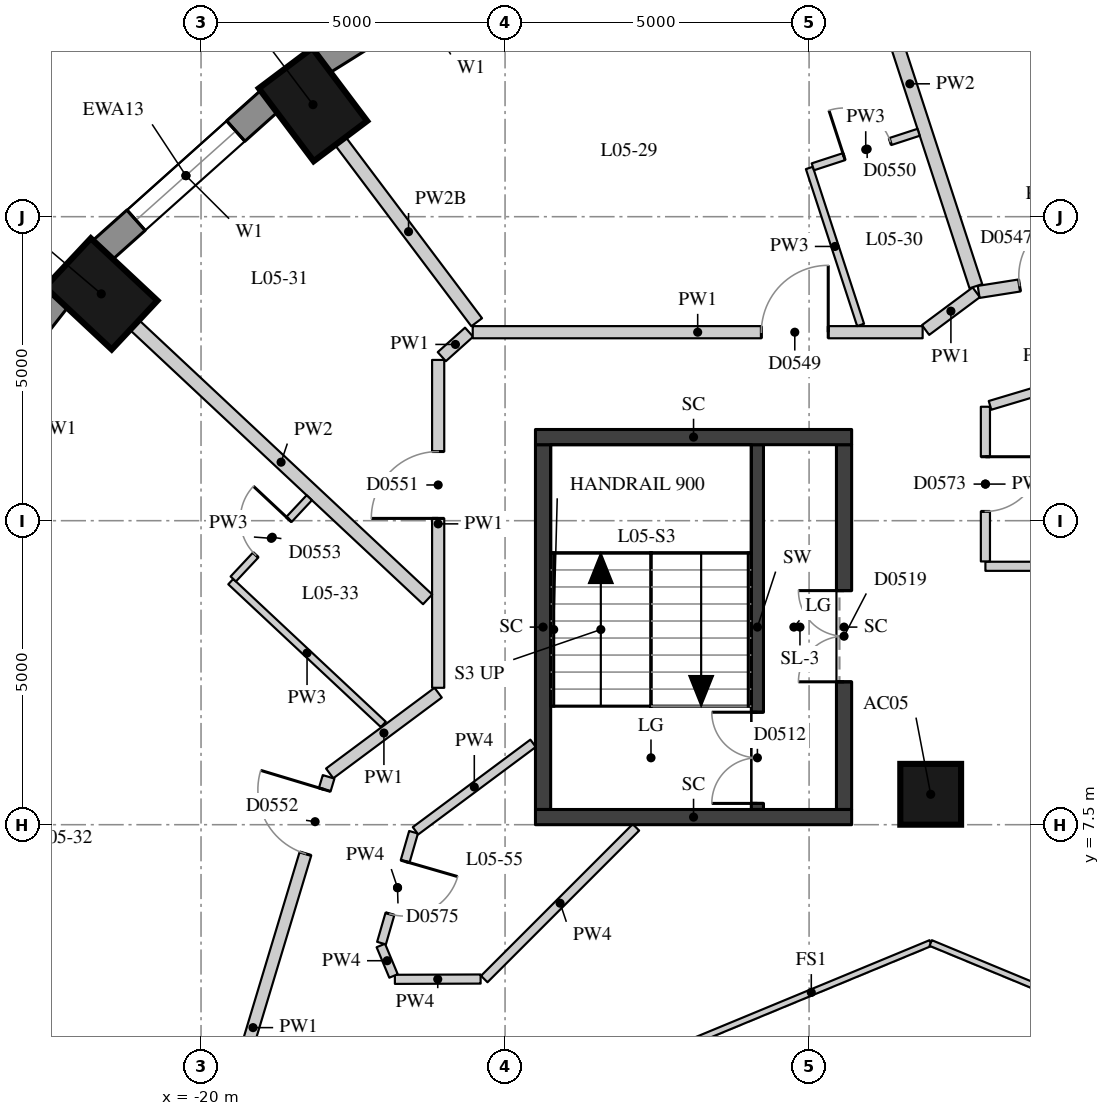
"""IFC4 building model, lengths in metres.
Left out: names, types, materials, properties, quantities, classifications, styles, units other than length and angle.
Written with IfcOpenShell. Run it as: python <this file> out.ifc"""

import sys

from ifc_helpers import new_model, si_unit, direction, frame, frame_2d, origin, origin_2d, place, context, subcontext, project, spatial, rectangle, extrude, element, fill, save


model = new_model("IFC4")
c1 = context("Model", 3, precision=1e-05, world=origin(), true_north=direction((0.0, 1.0)))
c2 = subcontext(c1, "Body", "Model", "MODEL_VIEW")
j1 = project(units=[si_unit("LENGTHUNIT", "METRE"), si_unit("PLANEANGLEUNIT", "RADIAN")], contexts=[c1])
p1 = place(None, origin())
s1 = spatial("IfcSite", under=j1, at=p1, CompositionType="ELEMENT")
p2 = place(p1, origin())
s2 = spatial("IfcBuilding", under=s1, at=p2, CompositionType="ELEMENT")
p3 = place(p2, frame((0.0, 0.0, 25.0)))
s3 = spatial("IfcBuildingStorey", under=s2, at=p3, CompositionType="ELEMENT", Elevation=25.0)
for number, where, z_axis, x_axis in (
    (1, (-18.159, 19.343, 0.0), (0.0, 0.0, 1.0), (-0.601, 0.799, 0.0)),
    (2, (-21.641, 16.23, 0.0), (0.0, 0.0, 1.0), (-0.73, 0.683, 0.0)),
):
    element("IfcColumn", number, at=place(p3, frame(where, z_axis=z_axis, x_axis=x_axis)), inside=s3, PredefinedType="COLUMN", context=c2, shape_type="SweptSolid", body=[
        extrude(rectangle(XDim=1.5, YDim=1.1, at=origin_2d()), origin(), (0.0, 0.0, 1.0), 3.3),
    ])
p4 = place(p3, frame((-8.0, 8.0, 0.0), z_axis=(0.0, 0.0, 1.0), x_axis=(1.0, 0.0, 0.0)))
e3 = element("IfcColumn", 3, at=p4, inside=s3, PredefinedType="COLUMN", context=c2, shape_type="SweptSolid", body=[
    extrude(rectangle(XDim=1.0, YDim=1.0, at=origin_2d()), origin(), (0.0, 0.0, 1.0), 3.3),
])
p5 = place(p3, frame((-14.817, 22.051, 0.0), z_axis=(0.0, 0.0, 1.0), x_axis=(-0.847635480093, -0.530579016629, 0.0)))
e4 = element("IfcWall", 4, at=p5, inside=s3, PredefinedType="SOLIDWALL", context=c2, shape_type="SweptSolid", body=[
    extrude(rectangle(XDim=3.782, YDim=0.45, at=frame_2d((1.891, 0.0))), origin(), (0.0, 0.0, 1.0), 3.02),
])
p6 = place(p5, frame((0.791, 0.0, 0.4)))
e5 = element("IfcOpeningElement", 5, at=p6, cuts=e4, PredefinedType="OPENING", context=c2, shape_type="SweptSolid", body=[
    extrude(rectangle(XDim=2.2, YDim=1.75, at=frame_2d((1.1, 0.875))), frame((0.0, 0.235, 0.0), z_axis=(0.0, -1.0, 0.0), x_axis=(1.0, 0.0, 0.0)), (0.0, 0.0, 1.0), 0.47),
])
p7 = place(p3, frame((-18.871, 19.407, 0.0), z_axis=(0.0, 0.0, 1.0), x_axis=(-0.745526233716, -0.66647628228, 0.0)))
e6 = element("IfcWall", 6, at=p7, inside=s3, PredefinedType="SOLIDWALL", context=c2, shape_type="SweptSolid", body=[
    extrude(rectangle(XDim=3.697, YDim=0.45, at=frame_2d((1.848, 0.0))), origin(), (0.0, 0.0, 1.0), 3.02),
])
p8 = place(p7, frame((0.749, 0.0, 0.4)))
e7 = element("IfcOpeningElement", 7, at=p8, cuts=e6, PredefinedType="OPENING", context=c2, shape_type="SweptSolid", body=[
    extrude(rectangle(XDim=2.2, YDim=1.75, at=frame_2d((1.1, 0.875))), frame((0.0, 0.235, 0.0), z_axis=(0.0, -1.0, 0.0), x_axis=(1.0, 0.0, 0.0)), (0.0, 0.0, 1.0), 0.47),
])
p9 = place(p3, frame((-22.352, 16.17, 0.0), z_axis=(0.0, 0.0, 1.0), x_axis=(-0.616661975264, -0.787228053529, 0.0)))
e8 = element("IfcWall", 8, at=p9, inside=s3, PredefinedType="SOLIDWALL", context=c2, shape_type="SweptSolid", body=[
    extrude(rectangle(XDim=3.61, YDim=0.45, at=frame_2d((1.805, 0.0))), origin(), (0.0, 0.0, 1.0), 3.02),
])
p10 = place(p9, frame((0.705, 0.0, 0.4)))
e9 = element("IfcOpeningElement", 9, at=p10, cuts=e8, PredefinedType="OPENING", context=c2, shape_type="SweptSolid", body=[
    extrude(rectangle(XDim=2.2, YDim=1.75, at=frame_2d((1.1, 0.875))), frame((0.0, 0.235, 0.0), z_axis=(0.0, -1.0, 0.0), x_axis=(1.0, 0.0, 0.0)), (0.0, 0.0, 1.0), 0.47),
])
p11 = place(p3, frame((-10.85, 7.75, 0.0), z_axis=(0.0, 0.0, 1.0), x_axis=(0.0, 1.0, 0.0)))
e10 = element("IfcWall", 10, at=p11, inside=s3, PredefinedType="SHEAR", context=c2, shape_type="SweptSolid", body=[
    extrude(rectangle(XDim=6.0, YDim=0.2, at=frame_2d((3.0, 0.0))), origin(), (0.0, 0.0, 1.0), 3.02),
])
p12 = place(p11, frame((0.1, 0.0, 0.0)))
e11 = element("IfcOpeningElement", 11, at=p12, cuts=e10, PredefinedType="OPENING", context=c2, shape_type="SweptSolid", body=[
    extrude(rectangle(XDim=1.5, YDim=2.1, at=frame_2d((0.75, 1.05))), frame((0.0, 0.11, 0.0), z_axis=(0.0, -1.0, 0.0), x_axis=(1.0, 0.0, 0.0)), (0.0, 0.0, 1.0), 0.22),
])
p13 = place(p3, frame((-14.375, 7.75, -0.28), z_axis=(0.0, 0.0, 1.0), x_axis=(0.0, 1.0, 0.0)))
e12 = element("IfcWall", 12, at=p13, inside=s3, PredefinedType="SHEAR", context=c2, shape_type="SweptSolid", body=[
    extrude(rectangle(XDim=6.0, YDim=0.25, at=frame_2d((3.0, 0.0))), origin(), (0.0, 0.0, 1.0), 3.3),
])
p14 = place(p3, frame((-9.425, 7.75, -0.28), z_axis=(0.0, 0.0, 1.0), x_axis=(0.0, 1.0, 0.0)))
e13 = element("IfcWall", 13, at=p14, inside=s3, PredefinedType="SHEAR", context=c2, shape_type="SweptSolid", body=[
    extrude(rectangle(XDim=6.0, YDim=0.25, at=frame_2d((3.0, 0.0))), origin(), (0.0, 0.0, 1.0), 3.3),
])
p15 = place(p14, frame((2.1, 0.0, 0.28)))
e14 = element("IfcOpeningElement", 14, at=p15, cuts=e13, PredefinedType="OPENING", context=c2, shape_type="SweptSolid", body=[
    extrude(rectangle(XDim=1.5, YDim=2.1, at=frame_2d((0.75, 1.05))), frame((0.0, 0.135, 0.0), z_axis=(0.0, -1.0, 0.0), x_axis=(1.0, 0.0, 0.0)), (0.0, 0.0, 1.0), 0.27),
])
for number, where, z_axis, x_axis in (
    (15, (-14.5, 13.875, -0.28), (0.0, 0.0, 1.0), (1.0, 0.0, 0.0)),
    (16, (-14.5, 7.625, -0.28), (0.0, 0.0, 1.0), (1.0, 0.0, 0.0)),
):
    element("IfcWall", number, at=place(p3, frame(where, z_axis=z_axis, x_axis=x_axis)), inside=s3, PredefinedType="SHEAR", context=c2, shape_type="SweptSolid", body=[
        extrude(rectangle(XDim=5.2, YDim=0.25, at=frame_2d((2.6, 0.0))), origin(), (0.0, 0.0, 1.0), 3.3),
    ])
p16 = place(p3, frame((-17.884, 8.344, 0.0), z_axis=(0.0, 0.0, 1.0), x_axis=(0.802260120548, 0.596974621721, 0.0)))
e17 = element("IfcWall", 17, at=p16, inside=s3, PredefinedType="PARTITIONING", context=c2, shape_type="SweptSolid", body=[
    extrude(rectangle(XDim=2.224, YDim=0.2, at=frame_2d((1.112, 0.0))), origin(), (0.0, 0.0, 1.0), 3.02),
])
p17 = place(p3, frame((-16.1, 9.751, 0.0), z_axis=(0.0, 0.0, 1.0), x_axis=(0.0, 1.0, 0.0)))
e18 = element("IfcWall", 18, at=p17, inside=s3, PredefinedType="PARTITIONING", context=c2, shape_type="SweptSolid", body=[
    extrude(rectangle(XDim=5.393, YDim=0.2, at=frame_2d((2.696, 0.0))), origin(), (0.0, 0.0, 1.0), 3.02),
])
p18 = place(p17, frame((2.786, 0.0, 0.0)))
e19 = element("IfcOpeningElement", 19, at=p18, cuts=e18, PredefinedType="OPENING", context=c2, shape_type="SweptSolid", body=[
    extrude(rectangle(XDim=1.1, YDim=2.1, at=frame_2d((0.55, 1.05))), frame((0.0, 0.11, 0.0), z_axis=(0.0, -1.0, 0.0), x_axis=(1.0, 0.0, 0.0)), (0.0, 0.0, 1.0), 0.22),
])
p19 = place(p3, frame((-16.041, 15.198, 0.0), z_axis=(0.0, 0.0, 1.0), x_axis=(0.744722115519, 0.667374685359, 0.0)))
e20 = element("IfcWall", 20, at=p19, inside=s3, PredefinedType="PARTITIONING", context=c2, shape_type="SweptSolid", body=[
    extrude(rectangle(XDim=0.603, YDim=0.2, at=frame_2d((0.301, 0.0))), origin(), (0.0, 0.0, 1.0), 3.02),
])
p20 = place(p3, frame((-15.531, 15.6, 0.0), z_axis=(0.0, 0.0, 1.0), x_axis=(1.0, 0.0, 0.0)))
e21 = element("IfcWall", 21, at=p20, inside=s3, PredefinedType="PARTITIONING", context=c2, shape_type="SweptSolid", body=[
    extrude(rectangle(XDim=7.399, YDim=0.2, at=frame_2d((3.699, 0.0))), origin(), (0.0, 0.0, 1.0), 3.02),
])
p21 = place(p20, frame((4.747, 0.0, 0.0)))
e22 = element("IfcOpeningElement", 22, at=p21, cuts=e21, PredefinedType="OPENING", context=c2, shape_type="SweptSolid", body=[
    extrude(rectangle(XDim=1.1, YDim=2.1, at=frame_2d((0.55, 1.05))), frame((0.0, 0.11, 0.0), z_axis=(0.0, -1.0, 0.0), x_axis=(1.0, 0.0, 0.0)), (0.0, 0.0, 1.0), 0.22),
])
p22 = place(p3, frame((-8.084, 15.636, 0.0), z_axis=(0.0, 0.0, 1.0), x_axis=(0.802193962144, 0.597063520155, 0.0)))
e23 = element("IfcWall", 23, at=p22, inside=s3, PredefinedType="PARTITIONING", context=c2, shape_type="SweptSolid", body=[
    extrude(rectangle(XDim=1.039, YDim=0.2, at=frame_2d((0.52, 0.0))), origin(), (0.0, 0.0, 1.0), 3.02),
])
p23 = place(p3, frame((-7.211, 16.263, 0.0), z_axis=(0.0, 0.0, 1.0), x_axis=(0.987792503573, 0.155775382796, 0.0)))
e24 = element("IfcWall", 24, at=p23, inside=s3, PredefinedType="PARTITIONING", context=c2, shape_type="SweptSolid", body=[
    extrude(rectangle(XDim=7.3, YDim=0.2, at=frame_2d((3.65, 0.0))), origin(), (0.0, 0.0, 1.0), 3.02),
])
p24 = place(p23, frame((5.581, 0.0, 0.0)))
e25 = element("IfcOpeningElement", 25, at=p24, cuts=e24, PredefinedType="OPENING", context=c2, shape_type="SweptSolid", body=[
    extrude(rectangle(XDim=1.0, YDim=2.1, at=frame_2d((0.5, 1.05))), frame((0.0, 0.11, 0.0), z_axis=(0.0, -1.0, 0.0), x_axis=(1.0, 0.0, 0.0)), (0.0, 0.0, 1.0), 0.22),
])
p25 = place(p23, frame((0.68, 0.0, 0.0)))
e26 = element("IfcOpeningElement", 26, at=p25, cuts=e24, PredefinedType="OPENING", context=c2, shape_type="SweptSolid", body=[
    extrude(rectangle(XDim=1.0, YDim=2.1, at=frame_2d((0.5, 1.05))), frame((0.0, 0.11, 0.0), z_axis=(0.0, -1.0, 0.0), x_axis=(1.0, 0.0, 0.0)), (0.0, 0.0, 1.0), 0.22),
])
p26 = place(p3, frame((-20.388, 0.038, 0.0), z_axis=(0.0, 0.0, 1.0), x_axis=(0.288600779805, 0.957449523419, 0.0)))
e27 = element("IfcWall", 27, at=p26, inside=s3, PredefinedType="PARTITIONING", context=c2, shape_type="SweptSolid", body=[
    extrude(rectangle(XDim=8.615, YDim=0.2, at=frame_2d((4.308, 0.0))), origin(), (0.0, 0.0, 1.0), 3.02),
])
p27 = place(p26, frame((7.295, 0.0, 0.0)))
e28 = element("IfcOpeningElement", 28, at=p27, cuts=e27, PredefinedType="OPENING", context=c2, shape_type="SweptSolid", body=[
    extrude(rectangle(XDim=1.1, YDim=2.1, at=frame_2d((0.55, 1.05))), frame((0.0, 0.11, 0.0), z_axis=(0.0, -1.0, 0.0), x_axis=(1.0, 0.0, 0.0)), (0.0, 0.0, 1.0), 0.22),
])
p28 = place(p26, frame((0.22, 0.0, 0.0)))
e29 = element("IfcOpeningElement", 29, at=p28, cuts=e27, PredefinedType="OPENING", context=c2, shape_type="SweptSolid", body=[
    extrude(rectangle(XDim=1.1, YDim=2.1, at=frame_2d((0.55, 1.05))), frame((0.0, 0.11, 0.0), z_axis=(0.0, -1.0, 0.0), x_axis=(1.0, 0.0, 0.0)), (0.0, 0.0, 1.0), 0.22),
])
p29 = place(p3, frame((-4.58, 11.75, 0.0), z_axis=(0.0, 0.0, 1.0), x_axis=(-1.0, 0.0, 0.0)))
e30 = element("IfcWall", 30, at=p29, inside=s3, PredefinedType="PARTITIONING", context=c2, shape_type="SweptSolid", body=[
    extrude(rectangle(XDim=2.52, YDim=0.15, at=frame_2d((1.26, 0.0))), origin(), (0.0, 0.0, 1.0), 3.02),
])
p30 = place(p3, frame((-7.1, 11.83, 0.0), z_axis=(0.0, 0.0, 1.0), x_axis=(0.0, 1.0, 0.0)))
e31 = element("IfcWall", 31, at=p30, inside=s3, PredefinedType="PARTITIONING", context=c2, shape_type="SweptSolid", body=[
    extrude(rectangle(XDim=2.544, YDim=0.15, at=frame_2d((1.272, 0.0))), origin(), (0.0, 0.0, 1.0), 3.02),
])
p31 = place(p30, frame((0.822, 0.0, 0.0)))
e32 = element("IfcOpeningElement", 32, at=p31, cuts=e31, PredefinedType="OPENING", context=c2, shape_type="SweptSolid", body=[
    extrude(rectangle(XDim=0.9, YDim=2.1, at=frame_2d((0.45, 1.05))), frame((0.0, 0.085, 0.0), z_axis=(0.0, -1.0, 0.0), x_axis=(1.0, 0.0, 0.0)), (0.0, 0.0, 1.0), 0.17),
])
p32 = place(p3, frame((-7.024, 14.396, 0.0), z_axis=(0.0, 0.0, 1.0), x_axis=(0.958024310194, 0.286686974028, 0.0)))
e33 = element("IfcWall", 33, at=p32, inside=s3, PredefinedType="PARTITIONING", context=c2, shape_type="SweptSolid", body=[
    extrude(rectangle(XDim=2.034, YDim=0.15, at=frame_2d((1.017, 0.0))), origin(), (0.0, 0.0, 1.0), 2.57),
])
p33 = place(p3, frame((-12.847, 7.456, 0.0), z_axis=(0.0, 0.0, 1.0), x_axis=(-0.707072180997, -0.707141379683, 0.0)))
e34 = element("IfcWall", 34, at=p33, inside=s3, PredefinedType="PARTITIONING", context=c2, shape_type="SweptSolid", body=[
    extrude(rectangle(XDim=3.528, YDim=0.15, at=frame_2d((1.764, 0.0))), origin(), (0.0, 0.0, 1.0), 3.02),
])
p34 = place(p3, frame((-15.402, 4.961, 0.0), z_axis=(0.0, 0.0, 1.0), x_axis=(-0.999994001087, -0.003463782477, 0.0)))
e35 = element("IfcWall", 35, at=p34, inside=s3, PredefinedType="PARTITIONING", context=c2, shape_type="SweptSolid", body=[
    extrude(rectangle(XDim=1.41, YDim=0.15, at=frame_2d((0.705, 0.0))), origin(), (0.0, 0.0, 1.0), 3.02),
])
p35 = place(p3, frame((-16.834, 5.012, 0.0), z_axis=(0.0, 0.0, 1.0), x_axis=(-0.384455737739, 0.923143426408, 0.0)))
e36 = element("IfcWall", 36, at=p35, inside=s3, PredefinedType="PARTITIONING", context=c2, shape_type="SweptSolid", body=[
    extrude(rectangle(XDim=0.543, YDim=0.15, at=frame_2d((0.271, 0.0))), origin(), (0.0, 0.0, 1.0), 3.02),
])
p36 = place(p3, frame((-17.032, 5.552, 0.0), z_axis=(0.0, 0.0, 1.0), x_axis=(0.277658349549, 0.96067988473, 0.0)))
e37 = element("IfcWall", 37, at=p36, inside=s3, PredefinedType="PARTITIONING", context=c2, shape_type="SweptSolid", body=[
    extrude(rectangle(XDim=1.898, YDim=0.15, at=frame_2d((0.949, 0.0))), origin(), (0.0, 0.0, 1.0), 3.02),
])
p37 = place(p36, frame((0.499, 0.0, 0.0)))
e38 = element("IfcOpeningElement", 38, at=p37, cuts=e37, PredefinedType="OPENING", context=c2, shape_type="SweptSolid", body=[
    extrude(rectangle(XDim=0.9, YDim=2.1, at=frame_2d((0.45, 1.05))), frame((0.0, 0.085, 0.0), z_axis=(0.0, -1.0, 0.0), x_axis=(1.0, 0.0, 0.0)), (0.0, 0.0, 1.0), 0.17),
])
p38 = place(p3, frame((-16.473, 7.4, 0.0), z_axis=(0.0, 0.0, 1.0), x_axis=(0.802267063429, 0.596965291233, 0.0)))
e39 = element("IfcWall", 39, at=p38, inside=s3, PredefinedType="PARTITIONING", context=c2, shape_type="SweptSolid", body=[
    extrude(rectangle(XDim=2.41, YDim=0.15, at=frame_2d((1.205, 0.0))), origin(), (0.0, 0.0, 1.0), 3.02),
])
p39 = place(p3, frame((-9.429, 23.014, 0.0), z_axis=(0.0, 0.0, 1.0), x_axis=(0.310239117306, -0.950658555998, 0.0)))
e40 = element("IfcWall", 40, at=p39, inside=s3, PredefinedType="PARTITIONING", context=c2, shape_type="SweptSolid", body=[
    extrude(rectangle(XDim=7.003, YDim=0.22, at=frame_2d((3.501, 0.0))), origin(), (0.0, 0.0, 1.0), 3.02),
])
p40 = place(p3, frame((-17.708, 18.743, 0.0), z_axis=(0.0, 0.0, 1.0), x_axis=(0.601172757903, -0.799119086967, 0.0)))
e41 = element("IfcWall", 41, at=p40, inside=s3, PredefinedType="PARTITIONING", context=c2, shape_type="SweptSolid", body=[
    extrude(rectangle(XDim=3.729, YDim=0.22, at=frame_2d((1.864, 0.0))), origin(), (0.0, 0.0, 1.0), 2.57),
])
p41 = place(p3, frame((-21.093, 15.718, 0.0), z_axis=(0.0, 0.0, 1.0), x_axis=(0.73009284205, -0.683347965525, 0.0)))
e42 = element("IfcWall", 42, at=p41, inside=s3, PredefinedType="PARTITIONING", context=c2, shape_type="SweptSolid", body=[
    extrude(rectangle(XDim=6.602, YDim=0.22, at=frame_2d((3.301, 0.0))), origin(), (0.0, 0.0, 1.0), 3.02),
])
p42 = place(p3, frame((-25.761, 3.964, 0.0), z_axis=(0.0, 0.0, 1.0), x_axis=(0.981209888948, -0.192943395406, 0.0)))
e43 = element("IfcWall", 43, at=p42, inside=s3, PredefinedType="PARTITIONING", context=c2, shape_type="SweptSolid", body=[
    extrude(rectangle(XDim=6.188, YDim=0.22, at=frame_2d((3.094, 0.0))), origin(), (0.0, 0.0, 1.0), 2.47),
])
p43 = place(p3, frame((-9.153, 15.719, 0.0), z_axis=(0.0, 0.0, 1.0), x_axis=(-0.310236037509, 0.950659561058, 0.0)))
e44 = element("IfcWall", 44, at=p43, inside=s3, PredefinedType="PARTITIONING", context=c2, shape_type="SweptSolid", body=[
    extrude(rectangle(XDim=2.717, YDim=0.12, at=frame_2d((1.358, 0.0))), origin(), (0.0, 0.0, 1.0), 3.02),
])
p44 = place(p3, frame((-17.002, 9.149, 0.0), z_axis=(0.0, 0.0, 1.0), x_axis=(-0.730093035944, 0.683347758368, 0.0)))
e45 = element("IfcWall", 45, at=p44, inside=s3, PredefinedType="PARTITIONING", context=c2, shape_type="SweptSolid", body=[
    extrude(rectangle(XDim=3.437, YDim=0.12, at=frame_2d((1.718, 0.0))), origin(), (0.0, 0.0, 1.0), 3.02),
])
p45 = place(p3, frame((-9.938, 18.32, 0.0), z_axis=(0.0, 0.0, 1.0), x_axis=(0.950678536911, 0.31017788357, 0.0)))
e46 = element("IfcWall", 46, at=p45, inside=s3, PredefinedType="PARTITIONING", context=c2, shape_type="SweptSolid", body=[
    extrude(rectangle(XDim=1.83, YDim=0.12, at=frame_2d((0.915, 0.0))), origin(), (0.0, 0.0, 1.0), 3.02),
])
p46 = place(p45, frame((0.54, 0.0, 0.0)))
e47 = element("IfcOpeningElement", 47, at=p46, cuts=e46, PredefinedType="OPENING", context=c2, shape_type="SweptSolid", body=[
    extrude(rectangle(XDim=0.8, YDim=2.1, at=frame_2d((0.4, 1.05))), frame((0.0, 0.07, 0.0), z_axis=(0.0, -1.0, 0.0), x_axis=(1.0, 0.0, 0.0)), (0.0, 0.0, 1.0), 0.14),
])
p47 = place(p3, frame((-19.47, 11.542, 0.0), z_axis=(0.0, 0.0, 1.0), x_axis=(0.683306289544, 0.730131847456, 0.0)))
e48 = element("IfcWall", 48, at=p47, inside=s3, PredefinedType="PARTITIONING", context=c2, shape_type="SweptSolid", body=[
    extrude(rectangle(XDim=1.83, YDim=0.12, at=frame_2d((0.915, 0.0))), origin(), (0.0, 0.0, 1.0), 3.02),
])
p48 = place(p47, frame((0.54, 0.0, 0.0)))
e49 = element("IfcOpeningElement", 49, at=p48, cuts=e48, PredefinedType="OPENING", context=c2, shape_type="SweptSolid", body=[
    extrude(rectangle(XDim=0.8, YDim=2.1, at=frame_2d((0.4, 1.05))), frame((0.0, 0.07, 0.0), z_axis=(0.0, -1.0, 0.0), x_axis=(1.0, 0.0, 0.0)), (0.0, 0.0, 1.0), 0.14),
])
for number, where, z_axis, x_axis in (
    (50, (-11.927, 3.927, 0.0), (0.0, 0.0, 1.0), (0.924, 0.383, 0.0)),
    (51, (-8.0, 5.554, 0.0), (0.0, 0.0, 1.0), (0.924, -0.383, 0.0)),
):
    element("IfcWall", number, at=place(p3, frame(where, z_axis=z_axis, x_axis=x_axis)), inside=s3, PredefinedType="PARTITIONING", context=c2, shape_type="SweptSolid", body=[
        extrude(rectangle(XDim=4.251, YDim=0.1, at=frame_2d((2.125, 0.0))), origin(), (0.0, 0.0, 1.0), 3.02),
    ])
p49 = place(p8, origin())
e52 = element("IfcWindow", 52, at=p49, inside=s3, PartitioningType="SINGLE_PANEL", PredefinedType="WINDOW", context=c2, shape_type="SweptSolid", body=[
    extrude(rectangle(XDim=2.2, YDim=1.75, at=frame_2d((1.1, 0.875))), frame((0.0, 0.035, 0.0), z_axis=(0.0, -1.0, 0.0), x_axis=(1.0, 0.0, 0.0)), (0.0, 0.0, 1.0), 0.06),
])
fill(e7, e52)
p50 = place(p12, origin())
e53 = element("IfcDoor", 53, at=p50, inside=s3, OperationType="DOUBLE_DOOR_SINGLE_SWING", PredefinedType="DOOR", context=c2, shape_type="SweptSolid", body=[
    extrude(rectangle(XDim=1.5, YDim=2.1, at=frame_2d((0.75, 1.05))), frame((0.0, 0.025, 0.0), z_axis=(0.0, -1.0, 0.0), x_axis=(1.0, 0.0, 0.0)), (0.0, 0.0, 1.0), 0.05),
])
fill(e11, e53)
p51 = place(p15, origin())
e54 = element("IfcDoor", 54, at=p51, inside=s3, OperationType="DOUBLE_DOOR_SINGLE_SWING", PredefinedType="DOOR", context=c2, shape_type="SweptSolid", body=[
    extrude(rectangle(XDim=1.5, YDim=2.1, at=frame_2d((0.75, 1.05))), frame((0.0, 0.025, 0.0), z_axis=(0.0, -1.0, 0.0), x_axis=(1.0, 0.0, 0.0)), (0.0, 0.0, 1.0), 0.05),
])
fill(e14, e54)
p52 = place(p25, origin())
e55 = element("IfcDoor", 55, at=p52, inside=s3, OperationType="SINGLE_SWING_RIGHT", PredefinedType="DOOR", context=c2, shape_type="SweptSolid", body=[
    extrude(rectangle(XDim=1.0, YDim=2.1, at=frame_2d((0.5, 1.05))), frame((0.0, 0.025, 0.0), z_axis=(0.0, -1.0, 0.0), x_axis=(1.0, 0.0, 0.0)), (0.0, 0.0, 1.0), 0.05),
])
fill(e26, e55)
p53 = place(p21, origin())
e56 = element("IfcDoor", 56, at=p53, inside=s3, OperationType="SINGLE_SWING_RIGHT", PredefinedType="DOOR", context=c2, shape_type="SweptSolid", body=[
    extrude(rectangle(XDim=1.1, YDim=2.1, at=frame_2d((0.55, 1.05))), frame((0.0, 0.025, 0.0), z_axis=(0.0, -1.0, 0.0), x_axis=(1.0, 0.0, 0.0)), (0.0, 0.0, 1.0), 0.05),
])
fill(e22, e56)
p54 = place(p46, origin())
e57 = element("IfcDoor", 57, at=p54, inside=s3, OperationType="SINGLE_SWING_LEFT", PredefinedType="DOOR", context=c2, shape_type="SweptSolid", body=[
    extrude(rectangle(XDim=0.8, YDim=2.1, at=frame_2d((0.4, 1.05))), frame((0.0, 0.025, 0.0), z_axis=(0.0, -1.0, 0.0), x_axis=(1.0, 0.0, 0.0)), (0.0, 0.0, 1.0), 0.05),
])
fill(e47, e57)
p55 = place(p18, origin())
e58 = element("IfcDoor", 58, at=p55, inside=s3, OperationType="SINGLE_SWING_LEFT", PredefinedType="DOOR", context=c2, shape_type="SweptSolid", body=[
    extrude(rectangle(XDim=1.1, YDim=2.1, at=frame_2d((0.55, 1.05))), frame((0.0, 0.025, 0.0), z_axis=(0.0, -1.0, 0.0), x_axis=(1.0, 0.0, 0.0)), (0.0, 0.0, 1.0), 0.05),
])
fill(e19, e58)
p56 = place(p27, origin())
e59 = element("IfcDoor", 59, at=p56, inside=s3, OperationType="SINGLE_SWING_RIGHT", PredefinedType="DOOR", context=c2, shape_type="SweptSolid", body=[
    extrude(rectangle(XDim=1.1, YDim=2.1, at=frame_2d((0.55, 1.05))), frame((0.0, 0.025, 0.0), z_axis=(0.0, -1.0, 0.0), x_axis=(1.0, 0.0, 0.0)), (0.0, 0.0, 1.0), 0.05),
])
fill(e28, e59)
p57 = place(p48, origin())
e60 = element("IfcDoor", 60, at=p57, inside=s3, OperationType="SINGLE_SWING_RIGHT", PredefinedType="DOOR", context=c2, shape_type="SweptSolid", body=[
    extrude(rectangle(XDim=0.8, YDim=2.1, at=frame_2d((0.4, 1.05))), frame((0.0, 0.025, 0.0), z_axis=(0.0, -1.0, 0.0), x_axis=(1.0, 0.0, 0.0)), (0.0, 0.0, 1.0), 0.05),
])
fill(e49, e60)
p58 = place(p31, origin())
e61 = element("IfcDoor", 61, at=p58, inside=s3, OperationType="SINGLE_SWING_LEFT", PredefinedType="DOOR", context=c2, shape_type="SweptSolid", body=[
    extrude(rectangle(XDim=0.9, YDim=2.1, at=frame_2d((0.45, 1.05))), frame((0.0, 0.025, 0.0), z_axis=(0.0, -1.0, 0.0), x_axis=(1.0, 0.0, 0.0)), (0.0, 0.0, 1.0), 0.05),
])
fill(e32, e61)
p59 = place(p37, origin())
e62 = element("IfcDoor", 62, at=p59, inside=s3, OperationType="SINGLE_SWING_LEFT", PredefinedType="DOOR", context=c2, shape_type="SweptSolid", body=[
    extrude(rectangle(XDim=0.9, YDim=2.1, at=frame_2d((0.45, 1.05))), frame((0.0, 0.025, 0.0), z_axis=(0.0, -1.0, 0.0), x_axis=(1.0, 0.0, 0.0)), (0.0, 0.0, 1.0), 0.05),
])
fill(e38, e62)
save(model, sys.argv[1])
